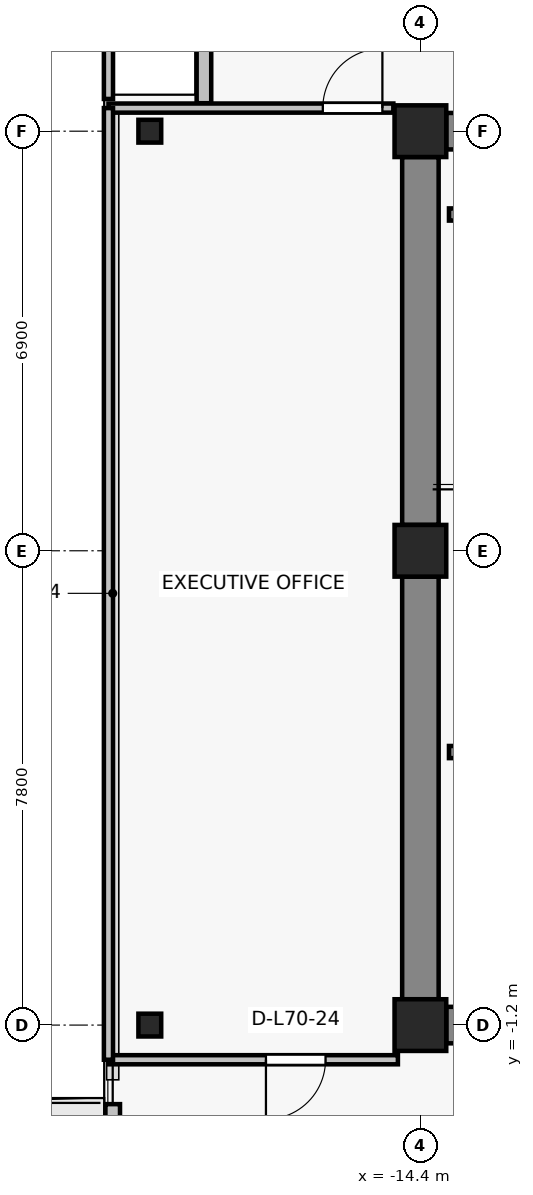
"""IFC4 building model, lengths in metres.
Left out: names, types, materials, properties, quantities, classifications, styles, units other than length and angle.
Written with IfcOpenShell. Run it as: python <this file> out.ifc"""

import sys

from ifc_helpers import new_model, si_unit, direction, frame, frame_2d, origin, origin_2d, place, context, subcontext, project, spatial, rectangle, i_section, extrude, source, transform, mapped, element, fill, save


model = new_model("IFC4")
c1 = context("Model", 3, precision=1e-05, world=origin(), true_north=direction((0.0, 1.0)))
c2 = subcontext(c1, "Body", "Model", "MODEL_VIEW")
j1 = project(units=[si_unit("LENGTHUNIT", "METRE"), si_unit("PLANEANGLEUNIT", "RADIAN")], contexts=[c1])
p1 = place(None, origin())
s1 = spatial("IfcSite", under=j1, at=p1, CompositionType="ELEMENT")
p2 = place(p1, origin())
s2 = spatial("IfcBuilding", under=s1, at=p2, CompositionType="ELEMENT")
p3 = place(p2, frame((0.0, 0.0, 248.5)))
s3 = spatial("IfcBuildingStorey", under=s2, at=p3, CompositionType="ELEMENT", Elevation=248.5)
for number, where, z_axis, x_axis in (
    (1, (-14.4, -1.2, 0.0), (0.0, 0.0, 1.0), (1.0, 0.0, 0.0)),
    (2, (-14.4, 6.6, 0.0), (0.0, 0.0, 1.0), (1.0, 0.0, 0.0)),
    (3, (-14.4, 13.5, 0.0), (0.0, 0.0, 1.0), (1.0, 0.0, 0.0)),
):
    element("IfcColumn", number, at=place(p3, frame(where, z_axis=z_axis, x_axis=x_axis)), inside=s3, PredefinedType="COLUMN", context=c2, shape_type="SweptSolid", body=[
        extrude(rectangle(XDim=0.85, YDim=0.85, at=origin_2d()), origin(), (0.0, 0.0, 1.0), 3.3),
    ])
for number, where, z_axis, x_axis in (
    (4, (-18.85, -1.2, 0.0), (0.0, 0.0, 1.0), (1.0, 0.0, 0.0)),
    (5, (-18.85, 13.5, 0.0), (0.0, 0.0, 1.0), (1.0, 0.0, 0.0)),
):
    element("IfcColumn", number, at=place(p3, frame(where, z_axis=z_axis, x_axis=x_axis)), inside=s3, PredefinedType="COLUMN", context=c2, shape_type="SweptSolid", body=[
        extrude(i_section(OverallWidth=0.375, OverallDepth=0.375, WebThickness=0.017, FlangeThickness=0.027, FilletRadius=0.015, at=origin_2d()), origin(), (0.0, 0.0, 1.0), 3.3),
    ])
p4 = place(p3, frame((-13.975, 13.5, 0.0), z_axis=(0.0, 0.0, 1.0), x_axis=(1.0, 0.0, 0.0)))
e6 = element("IfcWall", 6, at=p4, inside=s3, PredefinedType="SHEAR", context=c2, shape_type="SweptSolid", body=[
    extrude(rectangle(XDim=6.35, YDim=0.6, at=frame_2d((3.175, 0.0))), origin(), (0.0, 0.0, 1.0), 3.075),
])
p5 = place(p3, frame((-14.4, -0.775, 0.0), z_axis=(0.0, 0.0, 1.0), x_axis=(0.0, 1.0, 0.0)))
e7 = element("IfcWall", 7, at=p5, inside=s3, PredefinedType="SHEAR", context=c2, shape_type="SweptSolid", body=[
    extrude(rectangle(XDim=6.95, YDim=0.6, at=frame_2d((3.475, 0.0))), origin(), (0.0, 0.0, 1.0), 3.075),
])
p6 = place(p3, frame((-14.4, 7.025, 0.0), z_axis=(0.0, 0.0, 1.0), x_axis=(0.0, 1.0, 0.0)))
e8 = element("IfcWall", 8, at=p6, inside=s3, PredefinedType="SHEAR", context=c2, shape_type="SweptSolid", body=[
    extrude(rectangle(XDim=6.05, YDim=0.6, at=frame_2d((3.025, 0.0))), origin(), (0.0, 0.0, 1.0), 3.075),
])
p7 = place(p3, frame((-7.625, -1.2, 0.0), z_axis=(0.0, 0.0, 1.0), x_axis=(-1.0, 0.0, 0.0)))
e9 = element("IfcWall", 9, at=p7, inside=s3, PredefinedType="SHEAR", context=c2, shape_type="SweptSolid", body=[
    extrude(rectangle(XDim=6.35, YDim=0.6, at=frame_2d((3.175, 0.0))), origin(), (0.0, 0.0, 1.0), 3.075),
])
p8 = place(p7, frame((2.7, 0.0, 0.0)))
e10 = element("IfcOpeningElement", 10, at=p8, cuts=e9, PredefinedType="OPENING", context=c2, shape_type="SweptSolid", body=[
    extrude(rectangle(XDim=1.15, YDim=2.15, at=frame_2d((0.575, 1.075))), frame((0.0, 0.31, 0.0), z_axis=(0.0, -1.0, 0.0), x_axis=(1.0, 0.0, 0.0)), (0.0, 0.0, 1.0), 0.62),
])
p9 = place(p3, frame((-19.46, -8.3, 0.0), z_axis=(0.0, 0.0, 1.0), x_axis=(0.0, 1.0, 0.0)))
e11 = element("IfcWall", 11, at=p9, inside=s3, PredefinedType="SOLIDWALL", context=c2, shape_type="SweptSolid", body=[
    extrude(rectangle(XDim=5.8, YDim=0.24, at=frame_2d((2.9, 0.0))), origin(), (0.0, 0.0, 1.0), 3.075),
])
p10 = place(p9, frame((0.696, 0.0, 0.0)))
e12 = element("IfcOpeningElement", 12, at=p10, cuts=e11, PredefinedType="OPENING", context=c2, shape_type="SweptSolid", body=[
    extrude(rectangle(XDim=1.0, YDim=2.2, at=frame_2d((0.5, 1.1))), frame((0.0, 0.13, 0.0), z_axis=(0.0, -1.0, 0.0), x_axis=(1.0, 0.0, 0.0)), (0.0, 0.0, 1.0), 0.26),
])
p11 = place(p9, frame((2.046, 0.0, 0.85)))
e13 = element("IfcOpeningElement", 13, at=p11, cuts=e11, PredefinedType="OPENING", context=c2, shape_type="SweptSolid", body=[
    extrude(rectangle(XDim=1.2, YDim=1.5, at=frame_2d((0.6, 0.75))), frame((0.0, 0.13, 0.0), z_axis=(0.0, -1.0, 0.0), x_axis=(1.0, 0.0, 0.0)), (0.0, 0.0, 1.0), 0.26),
])
p12 = place(p3, frame((-17.96, 15.46, 0.0), z_axis=(0.0, 0.0, 1.0), x_axis=(0.0, -1.0, 0.0)))
e14 = element("IfcWall", 14, at=p12, inside=s3, PredefinedType="SOLIDWALL", context=c2, shape_type="SweptSolid", body=[
    extrude(rectangle(XDim=1.5, YDim=0.24, at=frame_2d((0.75, 0.0))), origin(), (0.0, 0.0, 1.0), 3.075),
])
p13 = place(p3, frame((-10.41, 3.29, 0.0), z_axis=(0.0, 0.0, 1.0), x_axis=(-1.0, 0.0, 0.0)))
e15 = element("IfcWall", 15, at=p13, inside=s3, PredefinedType="SOLIDWALL", context=c2, shape_type="SweptSolid", body=[
    extrude(rectangle(XDim=3.52, YDim=0.2, at=frame_2d((1.76, 0.0))), origin(), (0.0, 0.0, 1.0), 3.075),
])
p14 = place(p13, frame((1.165, 0.0, 0.0)))
e16 = element("IfcOpeningElement", 16, at=p14, cuts=e15, PredefinedType="OPENING", context=c2, shape_type="SweptSolid", body=[
    extrude(rectangle(XDim=1.15, YDim=2.15, at=frame_2d((0.575, 1.075))), frame((0.0, 0.11, 0.0), z_axis=(0.0, -1.0, 0.0), x_axis=(1.0, 0.0, 0.0)), (0.0, 0.0, 1.0), 0.22),
])
p15 = place(p3, frame((-13.93, 12.13, 0.0), z_axis=(0.0, 0.0, 1.0), x_axis=(1.0, 0.0, 0.0)))
e17 = element("IfcWall", 17, at=p15, inside=s3, PredefinedType="SOLIDWALL", context=c2, shape_type="SweptSolid", body=[
    extrude(rectangle(XDim=3.52, YDim=0.2, at=frame_2d((1.76, 0.0))), origin(), (0.0, 0.0, 1.0), 3.075),
])
p16 = place(p3, frame((-14.77, -1.77, 0.0), z_axis=(0.0, 0.0, 1.0), x_axis=(-1.0, 0.0, 0.0)))
e18 = element("IfcWall", 18, at=p16, inside=s3, PredefinedType="PARTITIONING", context=c2, shape_type="SweptSolid", body=[
    extrude(rectangle(XDim=4.76, YDim=0.15, at=frame_2d((2.38, 0.0))), origin(), (0.0, 0.0, 1.0), 2.765),
])
p17 = place(p16, frame((1.19, 0.0, 0.0)))
e19 = element("IfcOpeningElement", 19, at=p17, cuts=e18, PredefinedType="OPENING", context=c2, shape_type="SweptSolid", body=[
    extrude(rectangle(XDim=0.98, YDim=2.15, at=frame_2d((0.49, 1.075))), frame((0.0, 0.085, 0.0), z_axis=(0.0, -1.0, 0.0), x_axis=(1.0, 0.0, 0.0)), (0.0, 0.0, 1.0), 0.17),
])
p18 = place(p3, frame((-19.53, 13.88, 0.0), z_axis=(0.0, 0.0, 1.0), x_axis=(1.0, 0.0, 0.0)))
e20 = element("IfcWall", 20, at=p18, inside=s3, PredefinedType="PARTITIONING", context=c2, shape_type="SweptSolid", body=[
    extrude(rectangle(XDim=4.685, YDim=0.15, at=frame_2d((2.343, 0.0))), origin(), (0.0, 0.0, 1.0), 3.075),
])
p19 = place(p18, frame((3.525, 0.0, 0.0)))
e21 = element("IfcOpeningElement", 21, at=p19, cuts=e20, PredefinedType="OPENING", context=c2, shape_type="SweptSolid", body=[
    extrude(rectangle(XDim=0.98, YDim=2.15, at=frame_2d((0.49, 1.075))), frame((0.0, 0.085, 0.0), z_axis=(0.0, -1.0, 0.0), x_axis=(1.0, 0.0, 0.0)), (0.0, 0.0, 1.0), 0.17),
])
p20 = place(p3, frame((-19.53, -1.77, 0.0), z_axis=(0.0, 0.0, 1.0), x_axis=(0.0, 1.0, 0.0)))
e22 = element("IfcWall", 22, at=p20, inside=s3, PredefinedType="PARTITIONING", context=c2, shape_type="SweptSolid", body=[
    extrude(rectangle(XDim=15.65, YDim=0.15, at=frame_2d((7.825, 0.0))), origin(), (0.0, 0.0, 1.0), 3.075),
])
p21 = place(p3, frame((-19.53, 14.03, 0.0), z_axis=(0.0, 0.0, 1.0), x_axis=(0.0, 1.0, 0.0)))
e23 = element("IfcWall", 23, at=p21, inside=s3, PredefinedType="PARTITIONING", context=c2, shape_type="SweptSolid", body=[
    extrude(rectangle(XDim=3.0, YDim=0.15, at=frame_2d((1.5, 0.0))), origin(), (0.0, 0.0, 1.0), 3.075),
])
m1 = source(origin(), c2, "Body", "SweptSolid", [
    extrude(rectangle(XDim=0.98, YDim=2.15, at=frame_2d((0.49, 1.075))), frame((0.0, 0.025, 0.0), z_axis=(0.0, -1.0, 0.0), x_axis=(1.0, 0.0, 0.0)), (0.0, 0.0, 1.0), 0.05),
])
p22 = place(p17, origin())
e24 = element("IfcDoor", 24, at=p22, inside=s3, OperationType="SINGLE_SWING_RIGHT", PredefinedType="DOOR", context=c2, shape_type="MappedRepresentation", body=[
    mapped(m1, transform((0.0, 0.0, 0.0), x_axis=(1.0, 0.0, 0.0), y_axis=(0.0, 1.0, 0.0), z_axis=(0.0, 0.0, 1.0), scale=1.0)),
])
fill(e19, e24)
p23 = place(p19, origin())
e25 = element("IfcDoor", 25, at=p23, inside=s3, OperationType="SINGLE_SWING_RIGHT", PredefinedType="DOOR", context=c2, shape_type="MappedRepresentation", body=[
    mapped(m1, transform((0.0, 0.0, 0.0), x_axis=(1.0, 0.0, 0.0), y_axis=(0.0, 1.0, 0.0), z_axis=(0.0, 0.0, 1.0), scale=1.0)),
])
fill(e21, e25)
save(model, sys.argv[1])
